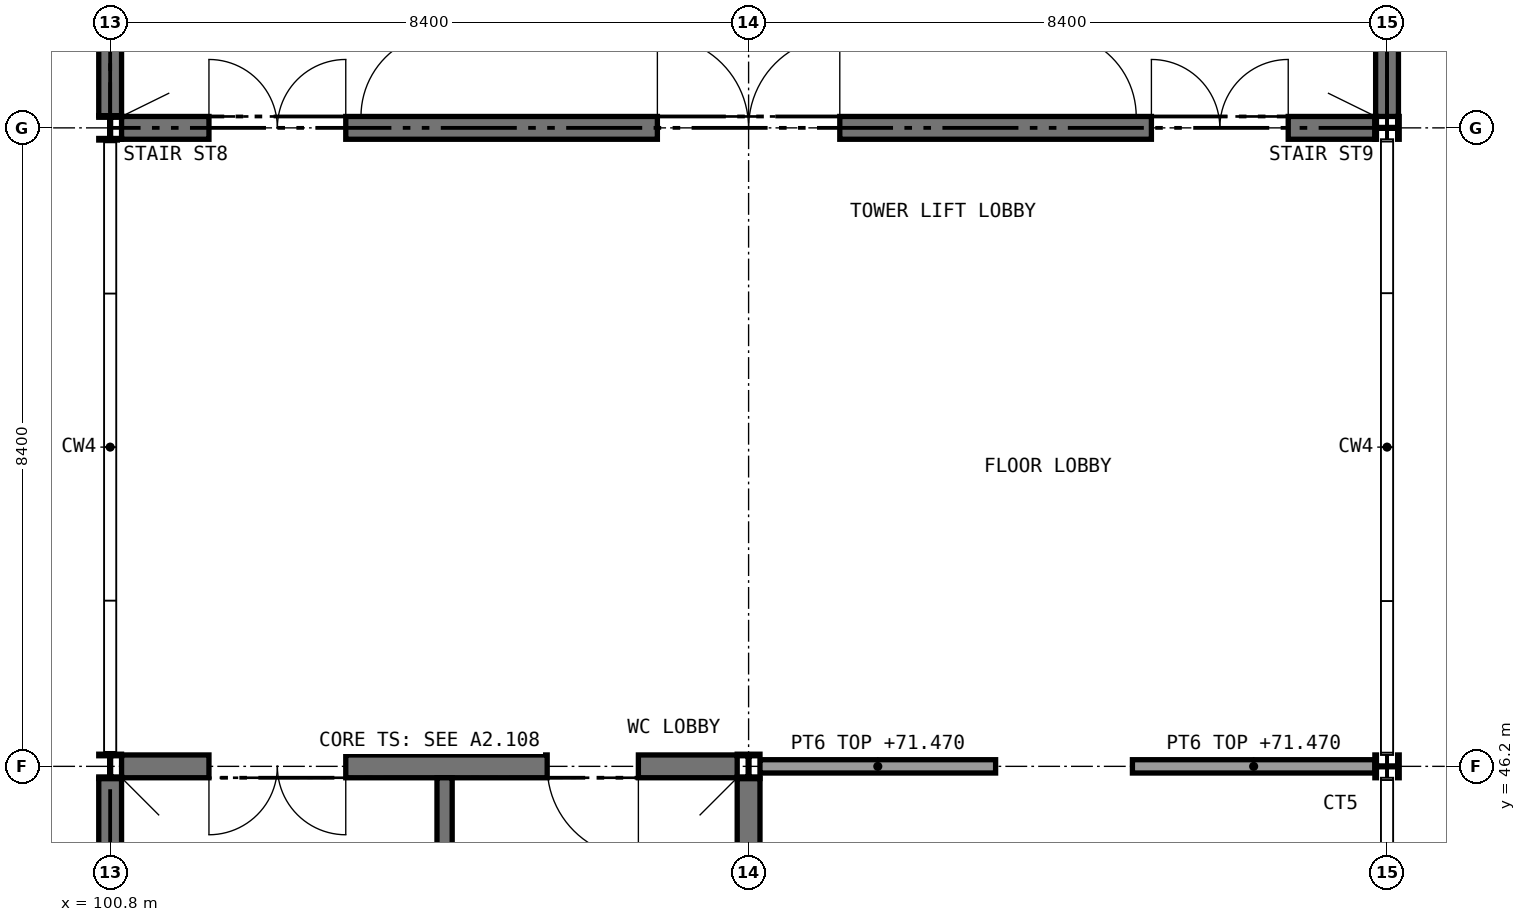
"""IFC4 building model, lengths in metres.
Left out: names, types, materials, properties, quantities, classifications, styles, units other than length and angle.
Written with IfcOpenShell. Run it as: python <this file> out.ifc"""

import sys

from ifc_helpers import new_model, si_unit, direction, frame, frame_2d, origin, origin_2d, place, context, subcontext, project, spatial, rectangle, hollow_rectangle, i_section, extrude, element, fill, save


model = new_model("IFC4")
c1 = context("Model", 3, precision=1e-05, world=origin(), true_north=direction((0.0, 1.0)))
c2 = subcontext(c1, "Body", "Model", "MODEL_VIEW")
j1 = project(units=[si_unit("LENGTHUNIT", "METRE"), si_unit("PLANEANGLEUNIT", "RADIAN")], contexts=[c1])
p1 = place(None, origin())
s1 = spatial("IfcSite", under=j1, at=p1, CompositionType="ELEMENT")
p2 = place(p1, origin())
s2 = spatial("IfcBuilding", under=s1, at=p2, CompositionType="ELEMENT")
p3 = place(p2, frame((0.0, 0.0, 67.6)))
s3 = spatial("IfcBuildingStorey", under=s2, at=p3, CompositionType="ELEMENT", Elevation=67.6)
p4 = place(p3, frame((100.95, 54.6, 0.0), z_axis=(0.0, 0.0, 1.0), x_axis=(1.0, 0.0, 0.0)))
e1 = element("IfcWall", 1, at=p4, inside=s3, PredefinedType="SHEAR", context=c2, shape_type="SweptSolid", body=[
    extrude(rectangle(XDim=16.49, YDim=0.3, at=frame_2d((8.245, 0.0))), origin(), (0.0, 0.0, 1.0), 4.2),
])
p5 = place(p4, frame((1.15, 0.0, 0.0)))
e2 = element("IfcOpeningElement", 2, at=p5, cuts=e1, PredefinedType="OPENING", context=c2, shape_type="SweptSolid", body=[
    extrude(rectangle(XDim=1.8, YDim=2.1, at=frame_2d((0.9, 1.05))), frame((0.0, 0.16, 0.0), z_axis=(0.0, -1.0, 0.0), x_axis=(1.0, 0.0, 0.0)), (0.0, 0.0, 1.0), 0.32),
])
p6 = place(p4, frame((13.55, 0.0, 0.0)))
e3 = element("IfcOpeningElement", 3, at=p6, cuts=e1, PredefinedType="OPENING", context=c2, shape_type="SweptSolid", body=[
    extrude(rectangle(XDim=1.8, YDim=2.1, at=frame_2d((0.9, 1.05))), frame((0.0, 0.16, 0.0), z_axis=(0.0, -1.0, 0.0), x_axis=(1.0, 0.0, 0.0)), (0.0, 0.0, 1.0), 0.32),
])
p7 = place(p4, frame((7.05, 0.0, 0.0)))
e4 = element("IfcOpeningElement", 4, at=p7, cuts=e1, PredefinedType="OPENING", context=c2, shape_type="SweptSolid", body=[
    extrude(rectangle(XDim=2.4, YDim=2.4, at=frame_2d((1.2, 1.2))), frame((0.0, 0.16, 0.0), z_axis=(0.0, -1.0, 0.0), x_axis=(1.0, 0.0, 0.0)), (0.0, 0.0, 1.0), 0.32),
])
p8 = place(p3, frame((100.8, 54.76, 0.0), z_axis=(0.0, 0.0, 1.0), x_axis=(0.0, 1.0, 0.0)))
e5 = element("IfcWall", 5, at=p8, inside=s3, PredefinedType="SHEAR", context=c2, shape_type="SweptSolid", body=[
    extrude(rectangle(XDim=8.08, YDim=0.3, at=frame_2d((4.04, 0.0))), origin(), (0.0, 0.0, 1.0), 4.2),
])
p9 = place(p3, frame((117.6, 54.75, 0.0), z_axis=(0.0, 0.0, 1.0), x_axis=(0.0, 1.0, 0.0)))
e6 = element("IfcWall", 6, at=p9, inside=s3, PredefinedType="SHEAR", context=c2, shape_type="SweptSolid", body=[
    extrude(rectangle(XDim=8.1, YDim=0.3, at=frame_2d((4.05, 0.0))), origin(), (0.0, 0.0, 1.0), 4.2),
])
p10 = place(p3, frame((100.95, 46.2, 0.0), z_axis=(0.0, 0.0, 1.0), x_axis=(1.0, 0.0, 0.0)))
e7 = element("IfcWall", 7, at=p10, inside=s3, PredefinedType="SHEAR", context=c2, shape_type="SweptSolid", body=[
    extrude(rectangle(XDim=8.1, YDim=0.3, at=frame_2d((4.05, 0.0))), origin(), (0.0, 0.0, 1.0), 4.2),
])
p11 = place(p10, frame((1.15, 0.0, 0.0)))
e8 = element("IfcOpeningElement", 8, at=p11, cuts=e7, PredefinedType="OPENING", context=c2, shape_type="SweptSolid", body=[
    extrude(rectangle(XDim=1.8, YDim=2.1, at=frame_2d((0.9, 1.05))), frame((0.0, 0.16, 0.0), z_axis=(0.0, -1.0, 0.0), x_axis=(1.0, 0.0, 0.0)), (0.0, 0.0, 1.0), 0.32),
])
p12 = place(p10, frame((5.6, 0.0, 0.0)))
e9 = element("IfcOpeningElement", 9, at=p12, cuts=e7, PredefinedType="OPENING", context=c2, shape_type="SweptSolid", body=[
    extrude(rectangle(XDim=1.2, YDim=2.1, at=frame_2d((0.6, 1.05))), frame((0.0, 0.16, 0.0), z_axis=(0.0, -1.0, 0.0), x_axis=(1.0, 0.0, 0.0)), (0.0, 0.0, 1.0), 0.32),
])
for number, where, z_axis, x_axis in (
    (10, (100.8, 37.96, 0.0), (0.0, 0.0, 1.0), (0.0, 1.0, 0.0)),
    (11, (109.2, 37.96, 0.0), (0.0, 0.0, 1.0), (0.0, 1.0, 0.0)),
):
    element("IfcWall", number, at=place(p3, frame(where, z_axis=z_axis, x_axis=x_axis)), inside=s3, PredefinedType="SHEAR", context=c2, shape_type="SweptSolid", body=[
        extrude(rectangle(XDim=8.08, YDim=0.3, at=frame_2d((4.04, 0.0))), origin(), (0.0, 0.0, 1.0), 4.2),
    ])
for number, where, z_axis, x_axis in (
    (12, (100.8, 46.2, 0.0), (0.0, 0.0, 1.0), (1.0, 0.0, 0.0)),
    (13, (100.8, 54.6, 0.0), (0.0, 0.0, 1.0), (1.0, 0.0, 0.0)),
    (14, (109.2, 46.2, 0.0), (0.0, 0.0, 1.0), (1.0, 0.0, 0.0)),
    (15, (117.6, 46.2, 0.0), (0.0, 0.0, 1.0), (0.0, 1.0, 0.0)),
    (16, (117.6, 54.6, 0.0), (0.0, 0.0, 1.0), (0.0, 1.0, 0.0)),
):
    element("IfcColumn", number, at=place(p3, frame(where, z_axis=z_axis, x_axis=x_axis)), inside=s3, PredefinedType="COLUMN", context=c2, shape_type="SweptSolid", body=[
        extrude(i_section(OverallWidth=0.3, OverallDepth=0.32, WebThickness=0.011, FlangeThickness=0.021, FilletRadius=0.027, at=origin_2d()), origin(), (0.0, 0.0, 1.0), 4.4),
    ])
p13 = place(p3, frame((100.8, 54.6, 4.4), z_axis=(0.0, 0.0, 1.0), x_axis=(1.0, 0.0, 0.0)))
e17 = element("IfcColumn", 17, at=p13, inside=s3, PredefinedType="COLUMN", context=c2, shape_type="SweptSolid", body=[
    extrude(hollow_rectangle(XDim=0.15, YDim=0.25, WallThickness=0.01, at=origin_2d()), origin(), (0.0, 0.0, 1.0), 3.0),
])
p14 = place(p3, frame((109.2, 54.6, 4.2), z_axis=(0.0, 0.0, 1.0), x_axis=(1.0, 0.0, 0.0)))
e18 = element("IfcColumn", 18, at=p14, inside=s3, PredefinedType="COLUMN", context=c2, shape_type="SweptSolid", body=[
    extrude(hollow_rectangle(XDim=0.15, YDim=0.25, WallThickness=0.01, at=origin_2d()), origin(), (0.0, 0.0, 1.0), 3.2),
])
p15 = place(p3, frame((117.6, 54.6, 4.4), z_axis=(0.0, 0.0, 1.0), x_axis=(1.0, 0.0, 0.0)))
e19 = element("IfcColumn", 19, at=p15, inside=s3, PredefinedType="COLUMN", context=c2, shape_type="SweptSolid", body=[
    extrude(hollow_rectangle(XDim=0.15, YDim=0.25, WallThickness=0.01, at=origin_2d()), origin(), (0.0, 0.0, 1.0), 3.0),
])
p16 = place(p3, frame((109.35, 46.2, 0.0), z_axis=(0.0, 0.0, 1.0), x_axis=(1.0, 0.0, 0.0)))
e20 = element("IfcWall", 20, at=p16, inside=s3, PredefinedType="PARTITIONING", context=c2, shape_type="SweptSolid", body=[
    extrude(rectangle(XDim=3.1, YDim=0.175, at=frame_2d((1.55, 0.0))), origin(), (0.0, 0.0, 1.0), 3.87),
])
p17 = place(p3, frame((114.25, 46.2, 0.0), z_axis=(0.0, 0.0, 1.0), x_axis=(1.0, 0.0, 0.0)))
e21 = element("IfcWall", 21, at=p17, inside=s3, PredefinedType="PARTITIONING", context=c2, shape_type="SweptSolid", body=[
    extrude(rectangle(XDim=3.19, YDim=0.175, at=frame_2d((1.595, 0.0))), origin(), (0.0, 0.0, 1.0), 3.87),
])
for number, where, z_axis, x_axis in (
    (22, (100.8, 54.6, 4.4), (0.0, 0.0, 1.0), (0.0, 1.0, 0.0)),
    (23, (117.6, 54.6, 4.4), (0.0, 0.0, 1.0), (0.0, 1.0, 0.0)),
):
    element("IfcWall", number, at=place(p3, frame(where, z_axis=z_axis, x_axis=x_axis)), inside=s3, PredefinedType="STANDARD", context=c2, shape_type="SweptSolid", body=[
        extrude(rectangle(XDim=8.4, YDim=0.3, at=frame_2d((4.2, 0.0))), origin(), (0.0, 0.0, 1.0), 3.0),
    ])
p18 = place(p3, frame((100.95, 54.6, 4.4), z_axis=(0.0, 0.0, 1.0), x_axis=(1.0, 0.0, 0.0)))
e24 = element("IfcWall", 24, at=p18, inside=s3, PredefinedType="STANDARD", context=c2, shape_type="SweptSolid", body=[
    extrude(rectangle(XDim=8.175, YDim=0.3, at=frame_2d((4.088, 0.0))), origin(), (0.0, 0.0, 1.0), 2.5),
])
p19 = place(p18, frame((1.5, 0.0, 0.0)))
e25 = element("IfcOpeningElement", 25, at=p19, cuts=e24, PredefinedType="OPENING", context=c2, shape_type="SweptSolid", body=[
    extrude(rectangle(XDim=1.1, YDim=2.1, at=frame_2d((0.55, 1.05))), frame((0.0, 0.16, 0.0), z_axis=(0.0, -1.0, 0.0), x_axis=(1.0, 0.0, 0.0)), (0.0, 0.0, 1.0), 0.32),
])
p20 = place(p18, frame((5.55, 0.0, 0.0)))
e26 = element("IfcOpeningElement", 26, at=p20, cuts=e24, PredefinedType="OPENING", context=c2, shape_type="SweptSolid", body=[
    extrude(rectangle(XDim=1.8, YDim=2.4, at=frame_2d((0.9, 1.2))), frame((0.0, 0.16, 0.0), z_axis=(0.0, -1.0, 0.0), x_axis=(1.0, 0.0, 0.0)), (0.0, 0.0, 1.0), 0.32),
])
p21 = place(p3, frame((109.275, 54.6, 4.4), z_axis=(0.0, 0.0, 1.0), x_axis=(1.0, 0.0, 0.0)))
e27 = element("IfcWall", 27, at=p21, inside=s3, PredefinedType="STANDARD", context=c2, shape_type="SweptSolid", body=[
    extrude(rectangle(XDim=8.175, YDim=0.3, at=frame_2d((4.087, 0.0))), origin(), (0.0, 0.0, 1.0), 2.5),
])
p22 = place(p21, frame((5.575, 0.0, 0.0)))
e28 = element("IfcOpeningElement", 28, at=p22, cuts=e27, PredefinedType="OPENING", context=c2, shape_type="SweptSolid", body=[
    extrude(rectangle(XDim=1.1, YDim=2.1, at=frame_2d((0.55, 1.05))), frame((0.0, 0.16, 0.0), z_axis=(0.0, -1.0, 0.0), x_axis=(1.0, 0.0, 0.0)), (0.0, 0.0, 1.0), 0.32),
])
p23 = place(p21, frame((0.825, 0.0, 0.0)))
e29 = element("IfcOpeningElement", 29, at=p23, cuts=e27, PredefinedType="OPENING", context=c2, shape_type="SweptSolid", body=[
    extrude(rectangle(XDim=1.8, YDim=2.4, at=frame_2d((0.9, 1.2))), frame((0.0, 0.16, 0.0), z_axis=(0.0, -1.0, 0.0), x_axis=(1.0, 0.0, 0.0)), (0.0, 0.0, 1.0), 0.32),
])
p24 = place(p3, frame((105.2, 62.85, 0.0), z_axis=(0.0, 0.0, 1.0), x_axis=(0.0, -1.0, 0.0)))
e30 = element("IfcWall", 30, at=p24, inside=s3, PredefinedType="SHEAR", context=c2, shape_type="SweptSolid", body=[
    extrude(rectangle(XDim=8.1, YDim=0.2, at=frame_2d((4.05, 0.0))), origin(), (0.0, 0.0, 1.0), 4.2),
])
p25 = place(p24, frame((7.0, 0.0, 0.0)))
e31 = element("IfcOpeningElement", 31, at=p25, cuts=e30, PredefinedType="OPENING", context=c2, shape_type="SweptSolid", body=[
    extrude(rectangle(XDim=1.11, YDim=2.1, at=frame_2d((0.555, 1.05))), frame((0.0, 0.11, 0.0), z_axis=(0.0, -1.0, 0.0), x_axis=(1.0, 0.0, 0.0)), (0.0, 0.0, 1.0), 0.22),
])
p26 = place(p3, frame((113.2, 62.85, 0.0), z_axis=(0.0, 0.0, 1.0), x_axis=(0.0, -1.0, 0.0)))
e32 = element("IfcWall", 32, at=p26, inside=s3, PredefinedType="SHEAR", context=c2, shape_type="SweptSolid", body=[
    extrude(rectangle(XDim=8.1, YDim=0.2, at=frame_2d((4.05, 0.0))), origin(), (0.0, 0.0, 1.0), 4.2),
])
p27 = place(p26, frame((7.0, 0.0, 0.0)))
e33 = element("IfcOpeningElement", 33, at=p27, cuts=e32, PredefinedType="OPENING", context=c2, shape_type="SweptSolid", body=[
    extrude(rectangle(XDim=1.11, YDim=2.1, at=frame_2d((0.555, 1.05))), frame((0.0, 0.11, 0.0), z_axis=(0.0, -1.0, 0.0), x_axis=(1.0, 0.0, 0.0)), (0.0, 0.0, 1.0), 0.22),
])
for number, where, z_axis, x_axis in (
    (34, (105.2, 62.85, 4.4), (0.0, 0.0, 1.0), (0.0, -1.0, 0.0)),
    (35, (113.2, 62.85, 4.4), (0.0, 0.0, 1.0), (0.0, -1.0, 0.0)),
):
    element("IfcWall", number, at=place(p3, frame(where, z_axis=z_axis, x_axis=x_axis)), inside=s3, PredefinedType="PARTITIONING", context=c2, shape_type="SweptSolid", body=[
        extrude(rectangle(XDim=8.1, YDim=0.2, at=frame_2d((4.05, 0.0))), origin(), (0.0, 0.0, 1.0), 2.6),
    ])
p28 = place(p3, frame((105.2, 37.95, 0.0), z_axis=(0.0, 0.0, 1.0), x_axis=(0.0, 1.0, 0.0)))
e36 = element("IfcWall", 36, at=p28, inside=s3, PredefinedType="SHEAR", context=c2, shape_type="SweptSolid", body=[
    extrude(rectangle(XDim=8.1, YDim=0.2, at=frame_2d((4.05, 0.0))), origin(), (0.0, 0.0, 1.0), 4.2),
])
p29 = place(p19, origin())
e37 = element("IfcDoor", 37, at=p29, inside=s3, OperationType="SINGLE_SWING_LEFT", PredefinedType="DOOR", context=c2, shape_type="SweptSolid", body=[
    extrude(rectangle(XDim=1.1, YDim=2.1, at=frame_2d((0.55, 1.05))), frame((0.0, 0.025, 0.0), z_axis=(0.0, -1.0, 0.0), x_axis=(1.0, 0.0, 0.0)), (0.0, 0.0, 1.0), 0.05),
])
fill(e25, e37)
p30 = place(p22, origin())
e38 = element("IfcDoor", 38, at=p30, inside=s3, OperationType="SINGLE_SWING_RIGHT", PredefinedType="DOOR", context=c2, shape_type="SweptSolid", body=[
    extrude(rectangle(XDim=1.1, YDim=2.1, at=frame_2d((0.55, 1.05))), frame((0.0, 0.025, 0.0), z_axis=(0.0, -1.0, 0.0), x_axis=(1.0, 0.0, 0.0)), (0.0, 0.0, 1.0), 0.05),
])
fill(e28, e38)
p31 = place(p20, frame((1.8, 0.0, 0.0), z_axis=(0.0, 0.0, 1.0), x_axis=(-1.0, 0.0, 0.0)))
e39 = element("IfcDoor", 39, at=p31, inside=s3, OperationType="DOUBLE_DOOR_SINGLE_SWING", PredefinedType="DOOR", context=c2, shape_type="SweptSolid", body=[
    extrude(rectangle(XDim=1.8, YDim=2.4, at=frame_2d((0.9, 1.2))), frame((0.0, 0.025, 0.0), z_axis=(0.0, -1.0, 0.0), x_axis=(1.0, 0.0, 0.0)), (0.0, 0.0, 1.0), 0.05),
])
fill(e26, e39)
p32 = place(p23, frame((1.8, 0.0, 0.0), z_axis=(0.0, 0.0, 1.0), x_axis=(-1.0, 0.0, 0.0)))
e40 = element("IfcDoor", 40, at=p32, inside=s3, OperationType="DOUBLE_DOOR_SINGLE_SWING", PredefinedType="DOOR", context=c2, shape_type="SweptSolid", body=[
    extrude(rectangle(XDim=1.8, YDim=2.4, at=frame_2d((0.9, 1.2))), frame((0.0, 0.025, 0.0), z_axis=(0.0, -1.0, 0.0), x_axis=(1.0, 0.0, 0.0)), (0.0, 0.0, 1.0), 0.05),
])
fill(e29, e40)
p33 = place(p25, frame((1.1, 0.0, 0.0), z_axis=(0.0, 0.0, 1.0), x_axis=(-1.0, 0.0, 0.0)))
e41 = element("IfcDoor", 41, at=p33, inside=s3, OperationType="SINGLE_SWING_LEFT", PredefinedType="DOOR", context=c2, shape_type="SweptSolid", body=[
    extrude(rectangle(XDim=1.1, YDim=2.1, at=frame_2d((0.55, 1.05))), frame((0.0, 0.025, 0.0), z_axis=(0.0, -1.0, 0.0), x_axis=(1.0, 0.0, 0.0)), (0.0, 0.0, 1.0), 0.05),
])
fill(e31, e41)
p34 = place(p27, origin())
e42 = element("IfcDoor", 42, at=p34, inside=s3, OperationType="SINGLE_SWING_RIGHT", PredefinedType="DOOR", context=c2, shape_type="SweptSolid", body=[
    extrude(rectangle(XDim=1.1, YDim=2.1, at=frame_2d((0.55, 1.05))), frame((0.0, 0.025, 0.0), z_axis=(0.0, -1.0, 0.0), x_axis=(1.0, 0.0, 0.0)), (0.0, 0.0, 1.0), 0.05),
])
fill(e33, e42)
p35 = place(p5, origin())
e43 = element("IfcDoor", 43, at=p35, inside=s3, OperationType="DOUBLE_DOOR_SINGLE_SWING", PredefinedType="DOOR", context=c2, shape_type="SweptSolid", body=[
    extrude(rectangle(XDim=1.8, YDim=2.1, at=frame_2d((0.9, 1.05))), frame((0.0, 0.025, 0.0), z_axis=(0.0, -1.0, 0.0), x_axis=(1.0, 0.0, 0.0)), (0.0, 0.0, 1.0), 0.05),
])
fill(e2, e43)
p36 = place(p6, origin())
e44 = element("IfcDoor", 44, at=p36, inside=s3, OperationType="DOUBLE_DOOR_SINGLE_SWING", PredefinedType="DOOR", context=c2, shape_type="SweptSolid", body=[
    extrude(rectangle(XDim=1.8, YDim=2.1, at=frame_2d((0.9, 1.05))), frame((0.0, 0.025, 0.0), z_axis=(0.0, -1.0, 0.0), x_axis=(1.0, 0.0, 0.0)), (0.0, 0.0, 1.0), 0.05),
])
fill(e3, e44)
p37 = place(p7, origin())
e45 = element("IfcDoor", 45, at=p37, inside=s3, OperationType="DOUBLE_DOOR_SINGLE_SWING", PredefinedType="DOOR", context=c2, shape_type="SweptSolid", body=[
    extrude(rectangle(XDim=2.4, YDim=2.4, at=frame_2d((1.2, 1.2))), frame((0.0, 0.025, 0.0), z_axis=(0.0, -1.0, 0.0), x_axis=(1.0, 0.0, 0.0)), (0.0, 0.0, 1.0), 0.05),
])
fill(e4, e45)
p38 = place(p11, frame((1.8, 0.0, 0.0), z_axis=(0.0, 0.0, 1.0), x_axis=(-1.0, 0.0, 0.0)))
e46 = element("IfcDoor", 46, at=p38, inside=s3, OperationType="DOUBLE_DOOR_SINGLE_SWING", PredefinedType="DOOR", context=c2, shape_type="SweptSolid", body=[
    extrude(rectangle(XDim=1.8, YDim=2.1, at=frame_2d((0.9, 1.05))), frame((0.0, 0.025, 0.0), z_axis=(0.0, -1.0, 0.0), x_axis=(1.0, 0.0, 0.0)), (0.0, 0.0, 1.0), 0.05),
])
fill(e8, e46)
p39 = place(p12, frame((1.2, 0.0, 0.0), z_axis=(0.0, 0.0, 1.0), x_axis=(-1.0, 0.0, 0.0)))
e47 = element("IfcDoor", 47, at=p39, inside=s3, OperationType="SINGLE_SWING_LEFT", PredefinedType="DOOR", context=c2, shape_type="SweptSolid", body=[
    extrude(rectangle(XDim=1.2, YDim=2.1, at=frame_2d((0.6, 1.05))), frame((0.0, 0.025, 0.0), z_axis=(0.0, -1.0, 0.0), x_axis=(1.0, 0.0, 0.0)), (0.0, 0.0, 1.0), 0.05),
])
fill(e9, e47)
save(model, sys.argv[1])
